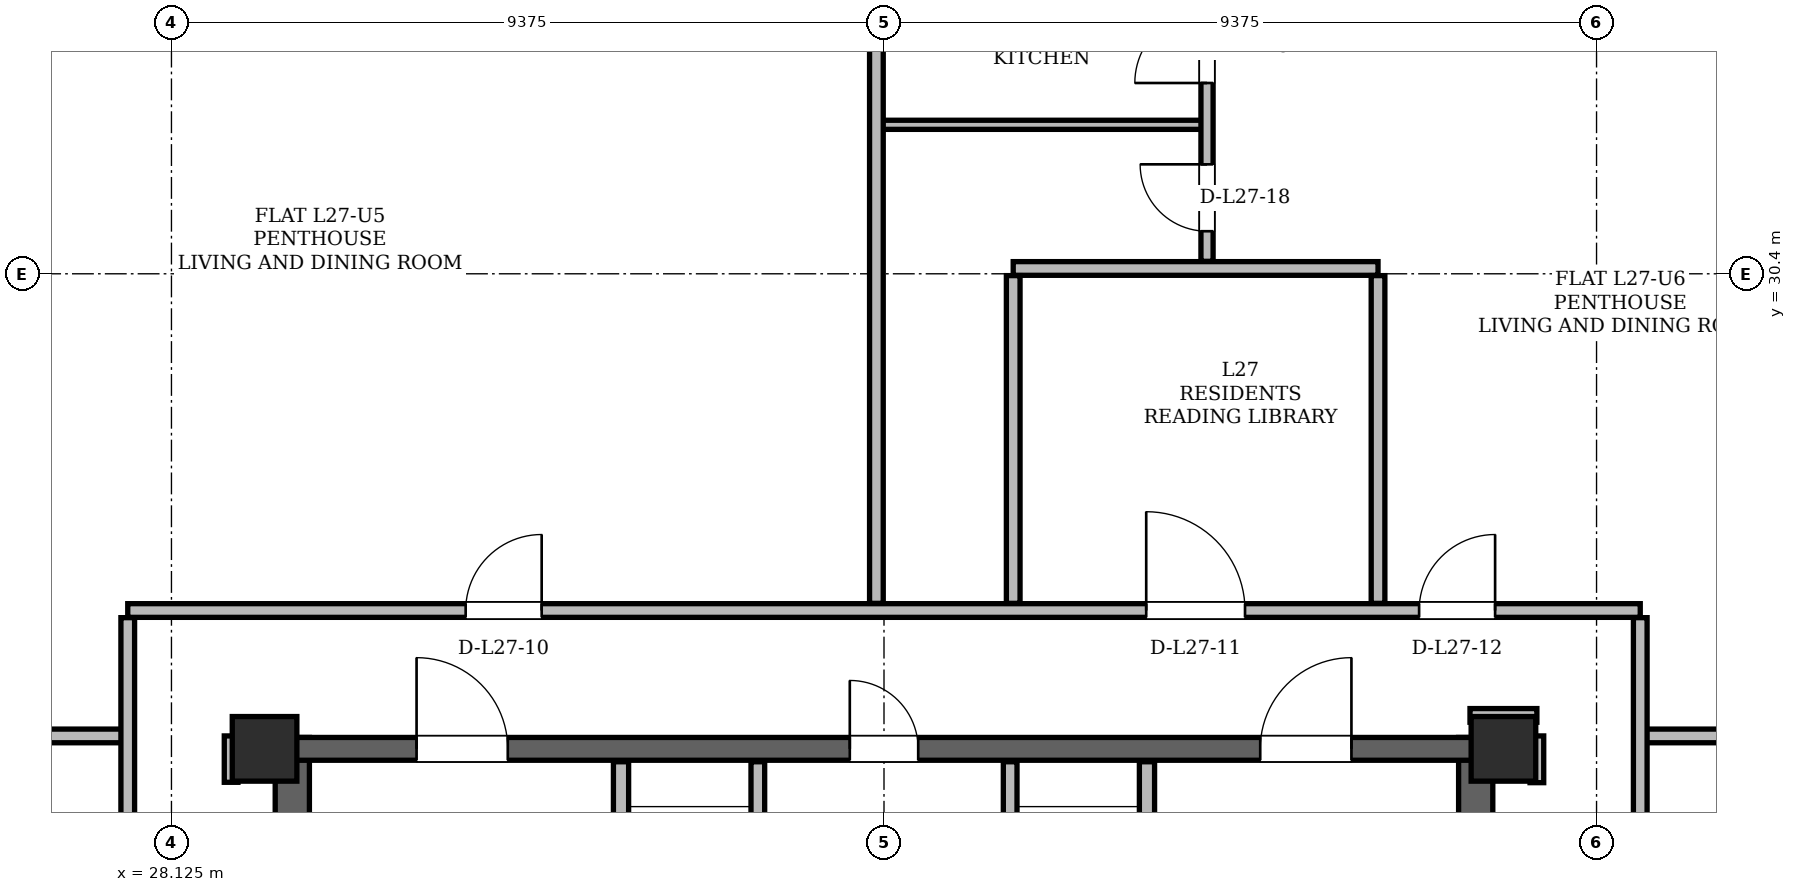
"""IFC4 building model, lengths in metres.
Left out: names, types, materials, properties, quantities, classifications, styles, units other than length and angle.
Written with IfcOpenShell. Run it as: python <this file> out.ifc"""

import sys

from ifc_helpers import new_model, si_unit, direction, frame, frame_2d, origin, origin_2d, place, context, subcontext, project, spatial, rectangle, hollow_rectangle, extrude, element, fill, save


model = new_model("IFC4")
c1 = context("Model", 3, precision=1e-05, world=origin(), true_north=direction((0.0, 1.0)))
c2 = subcontext(c1, "Body", "Model", "MODEL_VIEW")
j1 = project(units=[si_unit("LENGTHUNIT", "METRE"), si_unit("PLANEANGLEUNIT", "RADIAN")], contexts=[c1])
p1 = place(None, origin())
s1 = spatial("IfcSite", under=j1, at=p1, CompositionType="ELEMENT")
p2 = place(p1, origin())
s2 = spatial("IfcBuilding", under=s1, at=p2, CompositionType="ELEMENT")
p3 = place(p2, frame((0.0, 0.0, 104.1)))
s3 = spatial("IfcBuildingStorey", under=s2, at=p3, CompositionType="ELEMENT", Elevation=104.1)
for number, where, z_axis, x_axis in (
    (1, (45.65, 24.15, 0.0), (0.0, 0.0, 1.0), (1.0, 0.0, 0.0)),
    (2, (29.35, 24.15, 0.0), (0.0, 0.0, 1.0), (1.0, 0.0, 0.0)),
):
    element("IfcColumn", number, at=place(p3, frame(where, z_axis=z_axis, x_axis=x_axis)), inside=s3, PredefinedType="COLUMN", context=c2, shape_type="SweptSolid", body=[
        extrude(hollow_rectangle(XDim=0.85, YDim=0.85, WallThickness=0.07, at=origin_2d()), origin(), (0.0, 0.0, 1.0), 3.6),
    ])
for number, where, z_axis, x_axis in (
    (3, (29.715, 11.0, 0.0), (0.0, 0.0, 1.0), (0.0, 1.0, 0.0)),
    (4, (45.285, 11.0, 0.0), (0.0, 0.0, 1.0), (0.0, 1.0, 0.0)),
):
    element("IfcWall", number, at=place(p3, frame(where, z_axis=z_axis, x_axis=x_axis)), inside=s3, PredefinedType="SHEAR", context=c2, shape_type="SweptSolid", body=[
        extrude(rectangle(XDim=13.3, YDim=0.45, at=frame_2d((6.65, 0.0))), origin(), (0.0, 0.0, 1.0), 3.36),
    ])
p4 = place(p3, frame((29.65, 24.15, 0.0), z_axis=(0.0, 0.0, 1.0), x_axis=(1.0, 0.0, 0.0)))
e5 = element("IfcWall", 5, at=p4, inside=s3, PredefinedType="SHEAR", context=c2, shape_type="SweptSolid", body=[
    extrude(rectangle(XDim=15.7, YDim=0.3, at=frame_2d((7.85, 0.0))), origin(), (0.0, 0.0, 1.0), 3.36),
])
p5 = place(p4, frame((1.7, 0.0, 0.0)))
e6 = element("IfcOpeningElement", 6, at=p5, cuts=e5, PredefinedType="OPENING", context=c2, shape_type="SweptSolid", body=[
    extrude(rectangle(XDim=1.2, YDim=2.2, at=frame_2d((0.6, 1.1))), frame((0.0, 0.15, 0.0), z_axis=(0.0, -1.0, 0.0), x_axis=(1.0, 0.0, 0.0)), (0.0, 0.0, 1.0), 0.3),
])
p6 = place(p4, frame((12.8, 0.0, 0.0)))
e7 = element("IfcOpeningElement", 7, at=p6, cuts=e5, PredefinedType="OPENING", context=c2, shape_type="SweptSolid", body=[
    extrude(rectangle(XDim=1.2, YDim=2.2, at=frame_2d((0.6, 1.1))), frame((0.0, 0.15, 0.0), z_axis=(0.0, -1.0, 0.0), x_axis=(1.0, 0.0, 0.0)), (0.0, 0.0, 1.0), 0.3),
])
p7 = place(p4, frame((7.4, 0.0, 0.0)))
e8 = element("IfcOpeningElement", 8, at=p7, cuts=e5, PredefinedType="OPENING", context=c2, shape_type="SweptSolid", body=[
    extrude(rectangle(XDim=0.9, YDim=2.05, at=frame_2d((0.45, 1.025))), frame((0.0, 0.15, 0.0), z_axis=(0.0, -1.0, 0.0), x_axis=(1.0, 0.0, 0.0)), (0.0, 0.0, 1.0), 0.3),
])
p8 = place(p3, frame((60.635, 13.483, 0.0), z_axis=(0.0, 0.0, 1.0), x_axis=(-0.499998569178, 0.866026229868, 0.0)))
e9 = element("IfcWall", 9, at=p8, inside=s3, PredefinedType="SOLIDWALL", context=c2, shape_type="SweptSolid", body=[
    extrude(rectangle(XDim=34.595, YDim=0.34, at=frame_2d((17.298, 0.0))), origin(), (0.0, 0.0, 1.0), 2.578),
])
p9 = place(p8, frame((6.369, 0.0, 0.0)))
e10 = element("IfcOpeningElement", 10, at=p9, cuts=e9, PredefinedType="OPENING", context=c2, shape_type="SweptSolid", body=[
    extrude(rectangle(XDim=1.5, YDim=2.2, at=frame_2d((0.75, 1.1))), frame((0.0, 0.17, 0.0), z_axis=(0.0, -1.0, 0.0), x_axis=(1.0, 0.0, 0.0)), (0.0, 0.0, 1.0), 0.34),
])
p10 = place(p8, frame((25.061, 0.0, 0.0)))
e11 = element("IfcOpeningElement", 11, at=p10, cuts=e9, PredefinedType="OPENING", context=c2, shape_type="SweptSolid", body=[
    extrude(rectangle(XDim=1.5, YDim=2.2, at=frame_2d((0.75, 1.1))), frame((0.0, 0.17, 0.0), z_axis=(0.0, -1.0, 0.0), x_axis=(1.0, 0.0, 0.0)), (0.0, 0.0, 1.0), 0.34),
])
p11 = place(p8, frame((1.488, 0.0, 0.85)))
e12 = element("IfcOpeningElement", 12, at=p11, cuts=e9, PredefinedType="OPENING", context=c2, shape_type="SweptSolid", body=[
    extrude(rectangle(XDim=2.5, YDim=1.618, at=frame_2d((1.25, 0.809))), frame((0.0, 0.17, 0.0), z_axis=(0.0, -1.0, 0.0), x_axis=(1.0, 0.0, 0.0)), (0.0, 0.0, 1.0), 0.34),
])
p12 = place(p8, frame((11.047, 0.0, 0.85)))
e13 = element("IfcOpeningElement", 13, at=p12, cuts=e9, PredefinedType="OPENING", context=c2, shape_type="SweptSolid", body=[
    extrude(rectangle(XDim=1.2, YDim=1.48, at=frame_2d((0.6, 0.74))), frame((0.0, 0.17, 0.0), z_axis=(0.0, -1.0, 0.0), x_axis=(1.0, 0.0, 0.0)), (0.0, 0.0, 1.0), 0.34),
])
p13 = place(p8, frame((16.194, 0.0, 0.85)))
e14 = element("IfcOpeningElement", 14, at=p13, cuts=e9, PredefinedType="OPENING", context=c2, shape_type="SweptSolid", body=[
    extrude(rectangle(XDim=1.4, YDim=1.6, at=frame_2d((0.7, 0.8))), frame((0.0, 0.17, 0.0), z_axis=(0.0, -1.0, 0.0), x_axis=(1.0, 0.0, 0.0)), (0.0, 0.0, 1.0), 0.34),
])
p14 = place(p8, frame((30.772, 0.0, 0.85)))
e15 = element("IfcOpeningElement", 15, at=p14, cuts=e9, PredefinedType="OPENING", context=c2, shape_type="SweptSolid", body=[
    extrude(rectangle(XDim=2.5, YDim=1.618, at=frame_2d((1.25, 0.809))), frame((0.0, 0.17, 0.0), z_axis=(0.0, -1.0, 0.0), x_axis=(1.0, 0.0, 0.0)), (0.0, 0.0, 1.0), 0.34),
])
p15 = place(p3, frame((31.663, 43.444, 0.0), z_axis=(0.0, 0.0, 1.0), x_axis=(-0.499998569178, -0.866026229868, 0.0)))
e16 = element("IfcWall", 16, at=p15, inside=s3, PredefinedType="SOLIDWALL", context=c2, shape_type="SweptSolid", body=[
    extrude(rectangle(XDim=34.595, YDim=0.34, at=frame_2d((17.298, 0.0))), origin(), (0.0, 0.0, 1.0), 2.578),
])
p16 = place(p15, frame((3.219, 0.0, 0.0)))
e17 = element("IfcOpeningElement", 17, at=p16, cuts=e16, PredefinedType="OPENING", context=c2, shape_type="SweptSolid", body=[
    extrude(rectangle(XDim=1.5, YDim=2.2, at=frame_2d((0.75, 1.1))), frame((0.0, 0.17, 0.0), z_axis=(0.0, -1.0, 0.0), x_axis=(1.0, 0.0, 0.0)), (0.0, 0.0, 1.0), 0.34),
])
p17 = place(p15, frame((25.061, 0.0, 0.0)))
e18 = element("IfcOpeningElement", 18, at=p17, cuts=e16, PredefinedType="OPENING", context=c2, shape_type="SweptSolid", body=[
    extrude(rectangle(XDim=1.5, YDim=2.2, at=frame_2d((0.75, 1.1))), frame((0.0, 0.17, 0.0), z_axis=(0.0, -1.0, 0.0), x_axis=(1.0, 0.0, 0.0)), (0.0, 0.0, 1.0), 0.34),
])
p18 = place(p15, frame((31.728, 0.0, 0.85)))
e19 = element("IfcOpeningElement", 19, at=p18, cuts=e16, PredefinedType="OPENING", context=c2, shape_type="SweptSolid", body=[
    extrude(rectangle(XDim=1.6, YDim=1.618, at=frame_2d((0.8, 0.809))), frame((0.0, 0.17, 0.0), z_axis=(0.0, -1.0, 0.0), x_axis=(1.0, 0.0, 0.0)), (0.0, 0.0, 1.0), 0.34),
])
p19 = place(p15, frame((26.86, 0.0, 0.85)))
e20 = element("IfcOpeningElement", 20, at=p19, cuts=e16, PredefinedType="OPENING", context=c2, shape_type="SweptSolid", body=[
    extrude(rectangle(XDim=1.2, YDim=1.48, at=frame_2d((0.6, 0.74))), frame((0.0, 0.17, 0.0), z_axis=(0.0, -1.0, 0.0), x_axis=(1.0, 0.0, 0.0)), (0.0, 0.0, 1.0), 0.34),
])
p20 = place(p15, frame((11.256, 0.0, 0.85)))
e21 = element("IfcOpeningElement", 21, at=p20, cuts=e16, PredefinedType="OPENING", context=c2, shape_type="SweptSolid", body=[
    extrude(rectangle(XDim=1.8, YDim=1.618, at=frame_2d((0.9, 0.809))), frame((0.0, 0.17, 0.0), z_axis=(0.0, -1.0, 0.0), x_axis=(1.0, 0.0, 0.0)), (0.0, 0.0, 1.0), 0.34),
])
p21 = place(p15, frame((18.593, 0.0, 0.85)))
e22 = element("IfcOpeningElement", 22, at=p21, cuts=e16, PredefinedType="OPENING", context=c2, shape_type="SweptSolid", body=[
    extrude(rectangle(XDim=1.2, YDim=1.48, at=frame_2d((0.6, 0.74))), frame((0.0, 0.17, 0.0), z_axis=(0.0, -1.0, 0.0), x_axis=(1.0, 0.0, 0.0)), (0.0, 0.0, 1.0), 0.34),
])
p22 = place(p15, frame((1.106, 0.0, 0.85)))
e23 = element("IfcOpeningElement", 23, at=p22, cuts=e16, PredefinedType="OPENING", context=c2, shape_type="SweptSolid", body=[
    extrude(rectangle(XDim=1.6, YDim=1.618, at=frame_2d((0.8, 0.809))), frame((0.0, 0.17, 0.0), z_axis=(0.0, -1.0, 0.0), x_axis=(1.0, 0.0, 0.0)), (0.0, 0.0, 1.0), 0.34),
])
p23 = place(p3, frame((34.04, 19.48, 0.0), z_axis=(0.0, 0.0, 1.0), x_axis=(0.0, 1.0, 0.0)))
e24 = element("IfcWall", 24, at=p23, inside=s3, PredefinedType="PARTITIONING", context=c2, shape_type="SweptSolid", body=[
    extrude(rectangle(XDim=4.5, YDim=0.2, at=frame_2d((2.25, 0.0))), origin(), (0.0, 0.0, 1.0), 2.4),
])
p24 = place(p23, frame((2.12, 0.0, 0.0)))
e25 = element("IfcOpeningElement", 25, at=p24, cuts=e24, PredefinedType="OPENING", context=c2, shape_type="SweptSolid", body=[
    extrude(rectangle(XDim=1.1, YDim=2.2, at=frame_2d((0.55, 1.1))), frame((0.0, 0.1, 0.0), z_axis=(0.0, -1.0, 0.0), x_axis=(1.0, 0.0, 0.0)), (0.0, 0.0, 1.0), 0.2),
])
p25 = place(p3, frame((35.84, 20.96, 0.0), z_axis=(0.0, 0.0, 1.0), x_axis=(0.0, 1.0, 0.0)))
e26 = element("IfcWall", 26, at=p25, inside=s3, PredefinedType="PARTITIONING", context=c2, shape_type="SweptSolid", body=[
    extrude(rectangle(XDim=3.02, YDim=0.18, at=frame_2d((1.51, 0.0))), origin(), (0.0, 0.0, 1.0), 2.4),
])
p26 = place(p3, frame((40.96, 19.48, 0.0), z_axis=(0.0, 0.0, 1.0), x_axis=(0.0, 1.0, 0.0)))
e27 = element("IfcWall", 27, at=p26, inside=s3, PredefinedType="PARTITIONING", context=c2, shape_type="SweptSolid", body=[
    extrude(rectangle(XDim=4.5, YDim=0.2, at=frame_2d((2.25, 0.0))), origin(), (0.0, 0.0, 1.0), 2.4),
])
p27 = place(p26, frame((2.12, 0.0, 0.0)))
e28 = element("IfcOpeningElement", 28, at=p27, cuts=e27, PredefinedType="OPENING", context=c2, shape_type="SweptSolid", body=[
    extrude(rectangle(XDim=1.1, YDim=2.2, at=frame_2d((0.55, 1.1))), frame((0.0, 0.1, 0.0), z_axis=(0.0, -1.0, 0.0), x_axis=(1.0, 0.0, 0.0)), (0.0, 0.0, 1.0), 0.2),
])
p28 = place(p3, frame((39.16, 20.96, 0.0), z_axis=(0.0, 0.0, 1.0), x_axis=(0.0, 1.0, 0.0)))
e29 = element("IfcWall", 29, at=p28, inside=s3, PredefinedType="PARTITIONING", context=c2, shape_type="SweptSolid", body=[
    extrude(rectangle(XDim=3.02, YDim=0.18, at=frame_2d((1.51, 0.0))), origin(), (0.0, 0.0, 1.0), 2.4),
])
p29 = place(p3, frame((20.823, 24.32, 0.0), z_axis=(0.0, 0.0, 1.0), x_axis=(1.0, 0.0, 0.0)))
e30 = element("IfcWall", 30, at=p29, inside=s3, PredefinedType="PARTITIONING", context=c2, shape_type="SweptSolid", body=[
    extrude(rectangle(XDim=6.787, YDim=0.18, at=frame_2d((3.394, 0.0))), origin(), (0.0, 0.0, 1.0), 3.36),
])
p30 = place(p3, frame((47.45, 24.32, 0.0), z_axis=(0.0, 0.0, 1.0), x_axis=(1.0, 0.0, 0.0)))
e31 = element("IfcWall", 31, at=p30, inside=s3, PredefinedType="PARTITIONING", context=c2, shape_type="SweptSolid", body=[
    extrude(rectangle(XDim=6.727, YDim=0.18, at=frame_2d((3.364, 0.0))), origin(), (0.0, 0.0, 1.0), 3.36),
])
p31 = place(p3, frame((45.21, 24.59, 0.0), z_axis=(0.0, 0.0, 1.0), x_axis=(1.0, 0.0, 0.0)))
e32 = element("IfcWall", 32, at=p31, inside=s3, PredefinedType="PARTITIONING", context=c2, shape_type="SweptSolid", body=[
    extrude(rectangle(XDim=0.88, YDim=0.18, at=frame_2d((0.44, 0.0))), origin(), (0.0, 0.0, 1.0), 2.814),
])
p32 = place(p3, frame((27.55, 25.97, 0.0), z_axis=(0.0, 0.0, 1.0), x_axis=(1.0, 0.0, 0.0)))
e33 = element("IfcWall", 33, at=p32, inside=s3, PredefinedType="PARTITIONING", context=c2, shape_type="SweptSolid", body=[
    extrude(rectangle(XDim=19.9, YDim=0.18, at=frame_2d((9.95, 0.0))), origin(), (0.0, 0.0, 1.0), 2.814),
])
p33 = place(p32, frame((4.446, 0.0, 0.0)))
e34 = element("IfcOpeningElement", 34, at=p33, cuts=e33, PredefinedType="OPENING", context=c2, shape_type="SweptSolid", body=[
    extrude(rectangle(XDim=1.0, YDim=2.18, at=frame_2d((0.5, 1.09))), frame((0.0, 0.09, 0.0), z_axis=(0.0, -1.0, 0.0), x_axis=(1.0, 0.0, 0.0)), (0.0, 0.0, 1.0), 0.18),
])
p34 = place(p32, frame((13.4, 0.0, 0.0)))
e35 = element("IfcOpeningElement", 35, at=p34, cuts=e33, PredefinedType="OPENING", context=c2, shape_type="SweptSolid", body=[
    extrude(rectangle(XDim=1.3, YDim=2.2, at=frame_2d((0.65, 1.1))), frame((0.0, 0.09, 0.0), z_axis=(0.0, -1.0, 0.0), x_axis=(1.0, 0.0, 0.0)), (0.0, 0.0, 1.0), 0.18),
])
p35 = place(p32, frame((16.99, 0.0, 0.0)))
e36 = element("IfcOpeningElement", 36, at=p35, cuts=e33, PredefinedType="OPENING", context=c2, shape_type="SweptSolid", body=[
    extrude(rectangle(XDim=1.0, YDim=2.18, at=frame_2d((0.5, 1.09))), frame((0.0, 0.09, 0.0), z_axis=(0.0, -1.0, 0.0), x_axis=(1.0, 0.0, 0.0)), (0.0, 0.0, 1.0), 0.18),
])
p36 = place(p3, frame((39.2, 30.47, 0.0), z_axis=(0.0, 0.0, 1.0), x_axis=(1.0, 0.0, 0.0)))
e37 = element("IfcWall", 37, at=p36, inside=s3, PredefinedType="PARTITIONING", context=c2, shape_type="SweptSolid", body=[
    extrude(rectangle(XDim=4.8, YDim=0.18, at=frame_2d((2.4, 0.0))), origin(), (0.0, 0.0, 1.0), 3.36),
])
p37 = place(p3, frame((37.35, 32.36, 0.0), z_axis=(0.0, 0.0, 1.0), x_axis=(1.0, 0.0, 0.0)))
e38 = element("IfcWall", 38, at=p37, inside=s3, PredefinedType="PARTITIONING", context=c2, shape_type="SweptSolid", body=[
    extrude(rectangle(XDim=4.4, YDim=0.12, at=frame_2d((2.2, 0.0))), origin(), (0.0, 0.0, 1.0), 3.36),
])
p38 = place(p3, frame((27.55, 11.044, 0.0), z_axis=(0.0, 0.0, 1.0), x_axis=(0.0, 1.0, 0.0)))
e39 = element("IfcWall", 39, at=p38, inside=s3, PredefinedType="PARTITIONING", context=c2, shape_type="SweptSolid", body=[
    extrude(rectangle(XDim=14.832, YDim=0.18, at=frame_2d((7.416, 0.0))), origin(), (0.0, 0.0, 1.0), 2.814),
])
p39 = place(p38, frame((9.795, 0.0, 0.0)))
e40 = element("IfcOpeningElement", 40, at=p39, cuts=e39, PredefinedType="OPENING", context=c2, shape_type="SweptSolid", body=[
    extrude(rectangle(XDim=1.0, YDim=2.18, at=frame_2d((0.5, 1.09))), frame((0.0, 0.09, 0.0), z_axis=(0.0, -1.0, 0.0), x_axis=(1.0, 0.0, 0.0)), (0.0, 0.0, 1.0), 0.18),
])
p40 = place(p3, frame((28.91, 23.71, 0.0), z_axis=(0.0, 0.0, 1.0), x_axis=(0.0, 1.0, 0.0)))
e41 = element("IfcWall", 41, at=p40, inside=s3, PredefinedType="PARTITIONING", context=c2, shape_type="SweptSolid", body=[
    extrude(rectangle(XDim=0.61, YDim=0.18, at=frame_2d((0.305, 0.0))), origin(), (0.0, 0.0, 1.0), 3.36),
])
p41 = place(p3, frame((37.4, 26.064, 0.0), z_axis=(0.0, 0.0, 1.0), x_axis=(0.0, 1.0, 0.0)))
e42 = element("IfcWall", 42, at=p41, inside=s3, PredefinedType="PARTITIONING", context=c2, shape_type="SweptSolid", body=[
    extrude(rectangle(XDim=17.206, YDim=0.18, at=frame_2d((8.603, 0.0))), origin(), (0.0, 0.0, 1.0), 3.36),
])
p42 = place(p3, frame((39.2, 26.064, 0.0), z_axis=(0.0, 0.0, 1.0), x_axis=(0.0, 1.0, 0.0)))
e43 = element("IfcWall", 43, at=p42, inside=s3, PredefinedType="PARTITIONING", context=c2, shape_type="SweptSolid", body=[
    extrude(rectangle(XDim=4.312, YDim=0.18, at=frame_2d((2.156, 0.0))), origin(), (0.0, 0.0, 1.0), 3.36),
])
p43 = place(p3, frame((41.75, 30.564, 0.0), z_axis=(0.0, 0.0, 1.0), x_axis=(0.0, 1.0, 0.0)))
e44 = element("IfcWall", 44, at=p43, inside=s3, PredefinedType="PARTITIONING", context=c2, shape_type="SweptSolid", body=[
    extrude(rectangle(XDim=12.706, YDim=0.16, at=frame_2d((6.353, 0.0))), origin(), (0.0, 0.0, 1.0), 3.36),
])
p44 = place(p43, frame((0.396, 0.0, 0.0)))
e45 = element("IfcOpeningElement", 45, at=p44, cuts=e44, PredefinedType="OPENING", context=c2, shape_type="SweptSolid", body=[
    extrude(rectangle(XDim=0.88, YDim=2.08, at=frame_2d((0.44, 1.04))), frame((0.0, 0.08, 0.0), z_axis=(0.0, -1.0, 0.0), x_axis=(1.0, 0.0, 0.0)), (0.0, 0.0, 1.0), 0.16),
])
p45 = place(p43, frame((2.346, 0.0, 0.0)))
e46 = element("IfcOpeningElement", 46, at=p45, cuts=e44, PredefinedType="OPENING", context=c2, shape_type="SweptSolid", body=[
    extrude(rectangle(XDim=0.95, YDim=2.1, at=frame_2d((0.475, 1.05))), frame((0.0, 0.08, 0.0), z_axis=(0.0, -1.0, 0.0), x_axis=(1.0, 0.0, 0.0)), (0.0, 0.0, 1.0), 0.16),
])
p46 = place(p43, frame((7.843, 0.0, 0.0)))
e47 = element("IfcOpeningElement", 47, at=p46, cuts=e44, PredefinedType="OPENING", context=c2, shape_type="SweptSolid", body=[
    extrude(rectangle(XDim=0.92, YDim=2.12, at=frame_2d((0.46, 1.06))), frame((0.0, 0.08, 0.0), z_axis=(0.0, -1.0, 0.0), x_axis=(1.0, 0.0, 0.0)), (0.0, 0.0, 1.0), 0.16),
])
p47 = place(p3, frame((44.0, 26.064, 0.0), z_axis=(0.0, 0.0, 1.0), x_axis=(0.0, 1.0, 0.0)))
e48 = element("IfcWall", 48, at=p47, inside=s3, PredefinedType="PARTITIONING", context=c2, shape_type="SweptSolid", body=[
    extrude(rectangle(XDim=4.312, YDim=0.18, at=frame_2d((2.156, 0.0))), origin(), (0.0, 0.0, 1.0), 2.946),
])
p48 = place(p3, frame((46.09, 23.705, 0.0), z_axis=(0.0, 0.0, 1.0), x_axis=(0.0, 1.0, 0.0)))
e49 = element("IfcWall", 49, at=p48, inside=s3, PredefinedType="PARTITIONING", context=c2, shape_type="SweptSolid", body=[
    extrude(rectangle(XDim=0.615, YDim=0.18, at=frame_2d((0.308, 0.0))), origin(), (0.0, 0.0, 1.0), 2.946),
])
p49 = place(p3, frame((47.45, 11.044, 0.0), z_axis=(0.0, 0.0, 1.0), x_axis=(0.0, 1.0, 0.0)))
e50 = element("IfcWall", 50, at=p49, inside=s3, PredefinedType="PARTITIONING", context=c2, shape_type="SweptSolid", body=[
    extrude(rectangle(XDim=14.832, YDim=0.18, at=frame_2d((7.416, 0.0))), origin(), (0.0, 0.0, 1.0), 2.814),
])
p50 = place(p5, origin())
e51 = element("IfcDoor", 51, at=p50, inside=s3, OperationType="SINGLE_SWING_LEFT", PredefinedType="DOOR", context=c2, shape_type="SweptSolid", body=[
    extrude(rectangle(XDim=1.2, YDim=2.2, at=frame_2d((0.6, 1.1))), frame((0.0, 0.025, 0.0), z_axis=(0.0, -1.0, 0.0), x_axis=(1.0, 0.0, 0.0)), (0.0, 0.0, 1.0), 0.05),
])
fill(e6, e51)
p51 = place(p6, origin())
e52 = element("IfcDoor", 52, at=p51, inside=s3, OperationType="SINGLE_SWING_RIGHT", PredefinedType="DOOR", context=c2, shape_type="SweptSolid", body=[
    extrude(rectangle(XDim=1.2, YDim=2.2, at=frame_2d((0.6, 1.1))), frame((0.0, 0.025, 0.0), z_axis=(0.0, -1.0, 0.0), x_axis=(1.0, 0.0, 0.0)), (0.0, 0.0, 1.0), 0.05),
])
fill(e7, e52)
p52 = place(p7, origin())
e53 = element("IfcDoor", 53, at=p52, inside=s3, OperationType="SINGLE_SWING_LEFT", PredefinedType="DOOR", context=c2, shape_type="SweptSolid", body=[
    extrude(rectangle(XDim=0.9, YDim=2.05, at=frame_2d((0.45, 1.025))), frame((0.0, 0.025, 0.0), z_axis=(0.0, -1.0, 0.0), x_axis=(1.0, 0.0, 0.0)), (0.0, 0.0, 1.0), 0.05),
])
fill(e8, e53)
p53 = place(p33, origin())
e54 = element("IfcDoor", 54, at=p53, inside=s3, OperationType="SINGLE_SWING_RIGHT", PredefinedType="DOOR", context=c2, shape_type="SweptSolid", body=[
    extrude(rectangle(XDim=1.0, YDim=2.18, at=frame_2d((0.5, 1.09))), frame((0.0, 0.025, 0.0), z_axis=(0.0, -1.0, 0.0), x_axis=(1.0, 0.0, 0.0)), (0.0, 0.0, 1.0), 0.05),
])
fill(e34, e54)
p54 = place(p34, origin())
e55 = element("IfcDoor", 55, at=p54, inside=s3, OperationType="SINGLE_SWING_LEFT", PredefinedType="DOOR", context=c2, shape_type="SweptSolid", body=[
    extrude(rectangle(XDim=1.3, YDim=2.2, at=frame_2d((0.65, 1.1))), frame((0.0, 0.025, 0.0), z_axis=(0.0, -1.0, 0.0), x_axis=(1.0, 0.0, 0.0)), (0.0, 0.0, 1.0), 0.05),
])
fill(e35, e55)
p55 = place(p35, origin())
e56 = element("IfcDoor", 56, at=p55, inside=s3, OperationType="SINGLE_SWING_RIGHT", PredefinedType="DOOR", context=c2, shape_type="SweptSolid", body=[
    extrude(rectangle(XDim=1.0, YDim=2.18, at=frame_2d((0.5, 1.09))), frame((0.0, 0.025, 0.0), z_axis=(0.0, -1.0, 0.0), x_axis=(1.0, 0.0, 0.0)), (0.0, 0.0, 1.0), 0.05),
])
fill(e36, e56)
p56 = place(p44, origin())
e57 = element("IfcDoor", 57, at=p56, inside=s3, OperationType="SINGLE_SWING_RIGHT", PredefinedType="DOOR", context=c2, shape_type="SweptSolid", body=[
    extrude(rectangle(XDim=0.88, YDim=2.08, at=frame_2d((0.44, 1.04))), frame((0.0, 0.025, 0.0), z_axis=(0.0, -1.0, 0.0), x_axis=(1.0, 0.0, 0.0)), (0.0, 0.0, 1.0), 0.05),
])
fill(e45, e57)
p57 = place(p45, origin())
e58 = element("IfcDoor", 58, at=p57, inside=s3, OperationType="SINGLE_SWING_LEFT", PredefinedType="DOOR", context=c2, shape_type="SweptSolid", body=[
    extrude(rectangle(XDim=0.95, YDim=2.1, at=frame_2d((0.475, 1.05))), frame((0.0, 0.025, 0.0), z_axis=(0.0, -1.0, 0.0), x_axis=(1.0, 0.0, 0.0)), (0.0, 0.0, 1.0), 0.05),
])
fill(e46, e58)
save(model, sys.argv[1])
